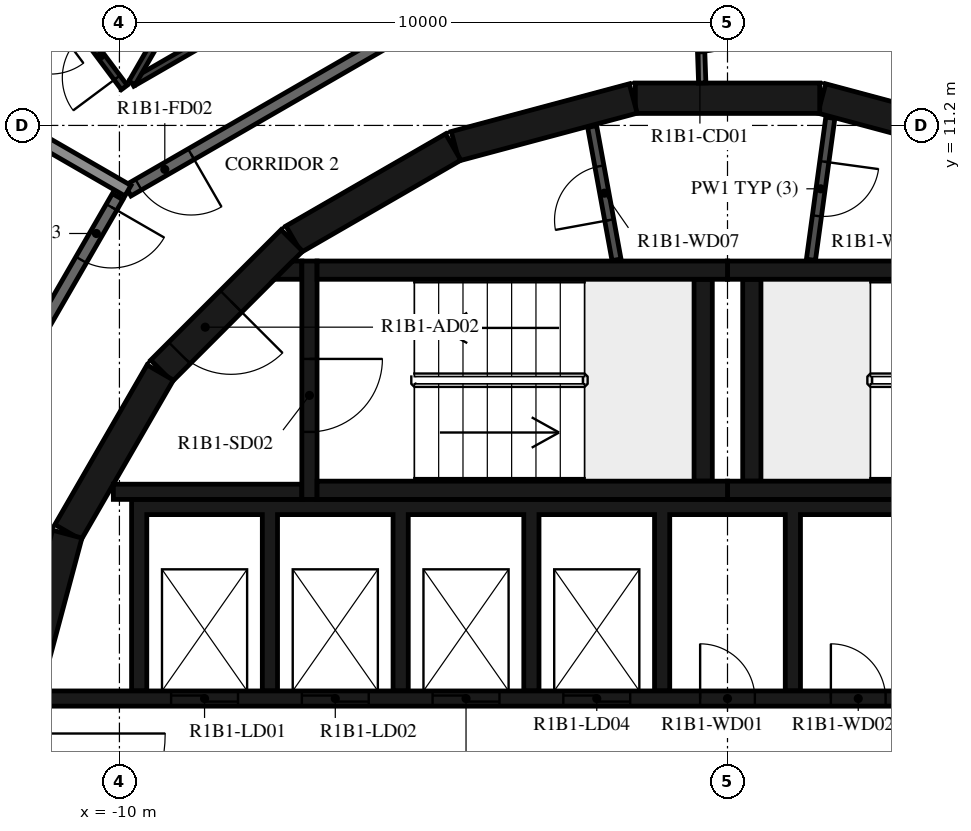
"""IFC4 building model, lengths in metres.
Left out: names, types, materials, properties, quantities, classifications, styles, units other than length and angle.
Written with IfcOpenShell. Run it as: python <this file> out.ifc"""

import sys

from ifc_helpers import new_model, si_unit, direction, frame, frame_2d, origin, place, context, subcontext, project, spatial, polyline, rectangle, outline, extrude, element, fill, save


model = new_model("IFC4")
c1 = context("Model", 3, precision=1e-05, world=origin(), true_north=direction((0.0, 1.0)))
c2 = subcontext(c1, "Body", "Model", "MODEL_VIEW")
j1 = project(units=[si_unit("LENGTHUNIT", "METRE"), si_unit("PLANEANGLEUNIT", "RADIAN")], contexts=[c1])
p1 = place(None, origin())
s1 = spatial("IfcSite", under=j1, at=p1, CompositionType="ELEMENT")
p2 = place(p1, origin())
s2 = spatial("IfcBuilding", under=s1, at=p2, CompositionType="ELEMENT")
p3 = place(p2, frame((0.0, 0.0, 48.9)))
s3 = spatial("IfcBuildingStorey", under=s2, at=p3, CompositionType="ELEMENT", Elevation=48.9)
for number, where, z_axis, x_axis in (
    (1, (4.479, 10.858, 0.0), (0.0, 0.0, 1.0), (-0.966, 0.259, 0.0)),
    (2, (1.516, 11.647, 0.0), (0.0, 0.0, 1.0), (-1.0, 0.0, 0.0)),
    (3, (-1.55, 11.643, 0.0), (0.0, 0.0, 1.0), (-0.966, -0.259, 0.0)),
    (4, (-4.51, 10.845, 0.0), (0.0, 0.0, 1.0), (-0.866, -0.5, 0.0)),
):
    element("IfcWall", number, at=place(p3, frame(where, z_axis=z_axis, x_axis=x_axis)), inside=s3, PredefinedType="SHEAR", context=c2, shape_type="SweptSolid", body=[
        extrude(rectangle(XDim=3.033, YDim=0.5, at=frame_2d((1.516, 0.0))), origin(), (0.0, 0.0, 1.0), 3.12),
    ])
p4 = place(p3, frame((-7.164, 9.308, 0.0), z_axis=(0.0, 0.0, 1.0), x_axis=(-0.707106781187, -0.707106781187, 0.0)))
e5 = element("IfcWall", 5, at=p4, inside=s3, PredefinedType="SHEAR", context=c2, shape_type="SweptSolid", body=[
    extrude(rectangle(XDim=3.032, YDim=0.5, at=frame_2d((1.516, 0.0))), origin(), (0.0, 0.0, 1.0), 3.12),
])
p5 = place(p4, frame((1.416, 0.0, 0.0)))
e6 = element("IfcOpeningElement", 6, at=p5, cuts=e5, PredefinedType="OPENING", context=c2, shape_type="SweptSolid", body=[
    extrude(rectangle(XDim=1.2, YDim=2.1, at=frame_2d((0.6, 1.05))), frame((0.0, 0.26, 0.0), z_axis=(0.0, -1.0, 0.0), x_axis=(1.0, 0.0, 0.0)), (0.0, 0.0, 1.0), 0.52),
])
for number, where, z_axis, x_axis in (
    (7, (-9.329, 7.137, 0.0), (0.0, 0.0, 1.0), (-0.5, -0.866, 0.0)),
    (8, (-10.858, 4.479, 0.0), (0.0, 0.0, 1.0), (-0.259, -0.966, 0.0)),
):
    element("IfcWall", number, at=place(p3, frame(where, z_axis=z_axis, x_axis=x_axis)), inside=s3, PredefinedType="SHEAR", context=c2, shape_type="SweptSolid", body=[
        extrude(rectangle(XDim=3.033, YDim=0.5, at=frame_2d((1.516, 0.0))), origin(), (0.0, 0.0, 1.0), 3.12),
    ])
for number, where, z_axis, x_axis in (
    (9, (0.0, 5.2, 0.0), (0.0, 0.0, 1.0), (1.0, 0.0, 0.0)),
    (10, (0.0, 8.82, 0.0), (0.0, 0.0, 1.0), (1.0, 0.0, 0.0)),
):
    element("IfcWall", number, at=place(p3, frame(where, z_axis=z_axis, x_axis=x_axis)), inside=s3, PredefinedType="SHEAR", context=c2, shape_type="SweptSolid", body=[
        extrude(rectangle(XDim=6.75, YDim=0.3, at=frame_2d((3.375, 0.0))), origin(), (0.0, 0.0, 1.0), 3.12),
    ])
p6 = place(p3, frame((0.4, 5.35, 0.0), z_axis=(0.0, 0.0, 1.0), x_axis=(0.0, 1.0, 0.0)))
e11 = element("IfcWall", 11, at=p6, inside=s3, PredefinedType="SHEAR", context=c2, shape_type="SweptSolid", body=[
    extrude(rectangle(XDim=3.32, YDim=0.3, at=frame_2d((1.66, 0.0))), origin(), (0.0, 0.0, 1.0), 3.12),
])
for number, where, z_axis, x_axis in (
    (12, (-6.75, 5.2, 0.0), (0.0, 0.0, 1.0), (1.0, 0.0, 0.0)),
    (13, (-6.75, 8.82, 0.0), (0.0, 0.0, 1.0), (1.0, 0.0, 0.0)),
):
    element("IfcWall", number, at=place(p3, frame(where, z_axis=z_axis, x_axis=x_axis)), inside=s3, PredefinedType="SHEAR", context=c2, shape_type="SweptSolid", body=[
        extrude(rectangle(XDim=6.75, YDim=0.3, at=frame_2d((3.375, 0.0))), origin(), (0.0, 0.0, 1.0), 3.12),
    ])
p7 = place(p3, frame((-0.4, 5.35, 0.0), z_axis=(0.0, 0.0, 1.0), x_axis=(0.0, 1.0, 0.0)))
e14 = element("IfcWall", 14, at=p7, inside=s3, PredefinedType="SHEAR", context=c2, shape_type="SweptSolid", body=[
    extrude(rectangle(XDim=3.32, YDim=0.3, at=frame_2d((1.66, 0.0))), origin(), (0.0, 0.0, 1.0), 3.12),
])
p8 = place(p3, frame((-6.875, 8.97, 0.0), z_axis=(0.0, 0.0, 1.0), x_axis=(0.0, -1.0, 0.0)))
e15 = element("IfcWall", 15, at=p8, inside=s3, PredefinedType="SHEAR", context=c2, shape_type="SweptSolid", body=[
    extrude(rectangle(XDim=3.92, YDim=0.25, at=frame_2d((1.96, 0.0))), origin(), (0.0, 0.0, 1.0), 3.12),
])
p9 = place(p8, frame((1.61, 0.0, 0.0)))
e16 = element("IfcOpeningElement", 16, at=p9, cuts=e15, PredefinedType="OPENING", context=c2, shape_type="SweptSolid", body=[
    extrude(rectangle(XDim=1.2, YDim=2.1, at=frame_2d((0.6, 1.05))), frame((0.0, 0.135, 0.0), z_axis=(0.0, -1.0, 0.0), x_axis=(1.0, 0.0, 0.0)), (0.0, 0.0, 1.0), 0.27),
])
p10 = place(p3, frame((-7.0, 5.175, 0.0), z_axis=(0.0, 0.0, 1.0), x_axis=(-1.0, 0.0, 0.0)))
e17 = element("IfcWall", 17, at=p10, inside=s3, PredefinedType="SHEAR", context=c2, shape_type="SweptSolid", body=[
    extrude(rectangle(XDim=3.1, YDim=0.25, at=frame_2d((1.55, 0.0))), origin(), (0.0, 0.0, 1.0), 3.12),
])
p11 = place(p3, origin())
e18 = element("IfcWall", 18, at=p11, inside=s3, PredefinedType="SHEAR", context=c2, shape_type="SweptSolid", body=[
    extrude(outline(polyline([(-7.148, 8.97), (-7.0, 8.97), (-7.0, 8.67), (-7.448, 8.67), (-7.148, 8.97)])), origin(), (0.0, 0.0, 1.0), 3.12),
])
p12 = place(p3, origin())
e19 = element("IfcWall", 19, at=p12, inside=s3, PredefinedType="SHEAR", context=c2, shape_type="SweptSolid", body=[
    extrude(outline(polyline([(-9.55, 4.8), (-7.65, 4.8), (-7.65, 1.9), (-7.4, 1.9), (-7.4, 4.8), (-5.5, 4.8), (-5.5, 1.9), (-5.25, 1.9), (-5.25, 4.8), (-3.35, 4.8), (-3.35, 1.9), (-3.1, 1.9), (-3.1, 4.8), (-1.2, 4.8), (-1.2, 1.9), (-0.95, 1.9), (-0.95, 4.8), (0.95, 4.8), (0.95, 1.9), (1.2, 1.9), (1.2, 4.8), (3.1, 4.8), (3.1, 1.9), (3.35, 1.9), (3.35, 4.8), (5.25, 4.8), (5.25, 1.9), (5.5, 1.9), (5.5, 4.8), (7.4, 4.8), (7.4, 1.9), (7.65, 1.9), (7.65, 4.8), (9.55, 4.8), (9.55, 1.9), (9.8, 1.9), (9.8, 4.8), (9.8, 5.05), (-9.8, 5.05), (-9.8, 4.8), (-9.8, 1.9), (-9.55, 1.9), (-9.55, 4.8)])), origin(), (0.0, 0.0, 1.0), 3.12),
])
p13 = place(p3, frame((-11.28, 1.775, 0.0), z_axis=(0.0, 0.0, 1.0), x_axis=(1.0, 0.0, 0.0)))
e20 = element("IfcWall", 20, at=p13, inside=s3, PredefinedType="SHEAR", context=c2, shape_type="SweptSolid", body=[
    extrude(rectangle(XDim=14.38, YDim=0.25, at=frame_2d((7.19, 0.0))), origin(), (0.0, 0.0, 1.0), 3.12),
])
p14 = place(p13, frame((2.13, 0.0, 0.0)))
e21 = element("IfcOpeningElement", 21, at=p14, cuts=e20, PredefinedType="OPENING", context=c2, shape_type="SweptSolid", body=[
    extrude(rectangle(XDim=1.1, YDim=2.1, at=frame_2d((0.55, 1.05))), frame((0.0, 0.135, 0.0), z_axis=(0.0, -1.0, 0.0), x_axis=(1.0, 0.0, 0.0)), (0.0, 0.0, 1.0), 0.27),
])
p15 = place(p13, frame((4.28, 0.0, 0.0)))
e22 = element("IfcOpeningElement", 22, at=p15, cuts=e20, PredefinedType="OPENING", context=c2, shape_type="SweptSolid", body=[
    extrude(rectangle(XDim=1.1, YDim=2.1, at=frame_2d((0.55, 1.05))), frame((0.0, 0.135, 0.0), z_axis=(0.0, -1.0, 0.0), x_axis=(1.0, 0.0, 0.0)), (0.0, 0.0, 1.0), 0.27),
])
p16 = place(p13, frame((6.43, 0.0, 0.0)))
e23 = element("IfcOpeningElement", 23, at=p16, cuts=e20, PredefinedType="OPENING", context=c2, shape_type="SweptSolid", body=[
    extrude(rectangle(XDim=1.1, YDim=2.1, at=frame_2d((0.55, 1.05))), frame((0.0, 0.135, 0.0), z_axis=(0.0, -1.0, 0.0), x_axis=(1.0, 0.0, 0.0)), (0.0, 0.0, 1.0), 0.27),
])
p17 = place(p13, frame((8.58, 0.0, 0.0)))
e24 = element("IfcOpeningElement", 24, at=p17, cuts=e20, PredefinedType="OPENING", context=c2, shape_type="SweptSolid", body=[
    extrude(rectangle(XDim=1.1, YDim=2.1, at=frame_2d((0.55, 1.05))), frame((0.0, 0.135, 0.0), z_axis=(0.0, -1.0, 0.0), x_axis=(1.0, 0.0, 0.0)), (0.0, 0.0, 1.0), 0.27),
])
p18 = place(p13, frame((10.83, 0.0, 0.0)))
e25 = element("IfcOpeningElement", 25, at=p18, cuts=e20, PredefinedType="OPENING", context=c2, shape_type="SweptSolid", body=[
    extrude(rectangle(XDim=0.9, YDim=2.1, at=frame_2d((0.45, 1.05))), frame((0.0, 0.135, 0.0), z_axis=(0.0, -1.0, 0.0), x_axis=(1.0, 0.0, 0.0)), (0.0, 0.0, 1.0), 0.27),
])
p19 = place(p13, frame((12.98, 0.0, 0.0)))
e26 = element("IfcOpeningElement", 26, at=p19, cuts=e20, PredefinedType="OPENING", context=c2, shape_type="SweptSolid", body=[
    extrude(rectangle(XDim=0.9, YDim=2.1, at=frame_2d((0.45, 1.05))), frame((0.0, 0.135, 0.0), z_axis=(0.0, -1.0, 0.0), x_axis=(1.0, 0.0, 0.0)), (0.0, 0.0, 1.0), 0.27),
])
p20 = place(p3, frame((1.691, 11.326, 0.0), z_axis=(0.0, 0.0, 1.0), x_axis=(-0.135344253201, -0.990798633994, 0.0)))
e27 = element("IfcWall", 27, at=p20, inside=s3, PredefinedType="PARTITIONING", context=c2, shape_type="SweptSolid", body=[
    extrude(rectangle(XDim=2.358, YDim=0.15, at=frame_2d((1.179, 0.0))), origin(), (0.0, 0.0, 1.0), 3.12),
])
p21 = place(p20, frame((0.729, 0.0, 0.0)))
e28 = element("IfcOpeningElement", 28, at=p21, cuts=e27, PredefinedType="OPENING", context=c2, shape_type="SweptSolid", body=[
    extrude(rectangle(XDim=0.9, YDim=2.1, at=frame_2d((0.45, 1.05))), frame((0.0, 0.085, 0.0), z_axis=(0.0, -1.0, 0.0), x_axis=(1.0, 0.0, 0.0)), (0.0, 0.0, 1.0), 0.17),
])
p22 = place(p3, frame((-1.825, 8.99, 0.0), z_axis=(0.0, 0.0, 1.0), x_axis=(-0.179955206115, 0.983674805915, 0.0)))
e29 = element("IfcWall", 29, at=p22, inside=s3, PredefinedType="PARTITIONING", context=c2, shape_type="SweptSolid", body=[
    extrude(rectangle(XDim=2.229, YDim=0.15, at=frame_2d((1.115, 0.0))), origin(), (0.0, 0.0, 1.0), 3.12),
])
p23 = place(p22, frame((0.665, 0.0, 0.0)))
e30 = element("IfcOpeningElement", 30, at=p23, cuts=e29, PredefinedType="OPENING", context=c2, shape_type="SweptSolid", body=[
    extrude(rectangle(XDim=0.9, YDim=2.1, at=frame_2d((0.45, 1.05))), frame((0.0, 0.085, 0.0), z_axis=(0.0, -1.0, 0.0), x_axis=(1.0, 0.0, 0.0)), (0.0, 0.0, 1.0), 0.17),
])
p24 = place(p3, frame((-0.479, 13.7, 0.0), z_axis=(0.0, 0.0, 1.0), x_axis=(0.034919103017, -0.999390142159, 0.0)))
e31 = element("IfcWall", 31, at=p24, inside=s3, PredefinedType="PARTITIONING", context=c2, shape_type="SweptSolid", body=[
    extrude(rectangle(XDim=1.804, YDim=0.12, at=frame_2d((0.902, 0.0))), origin(), (0.0, 0.0, 1.0), 3.12),
])
p25 = place(p24, frame((0.11, 0.0, 0.0)))
e32 = element("IfcOpeningElement", 32, at=p25, cuts=e31, PredefinedType="OPENING", context=c2, shape_type="SweptSolid", body=[
    extrude(rectangle(XDim=1.2, YDim=2.1, at=frame_2d((0.6, 1.05))), frame((0.0, 0.07, 0.0), z_axis=(0.0, -1.0, 0.0), x_axis=(1.0, 0.0, 0.0)), (0.0, 0.0, 1.0), 0.14),
])
p26 = place(p3, frame((-3.671, 13.7, 0.0), z_axis=(0.0, 0.0, 1.0), x_axis=(-0.866031419417, -0.499989580474, 0.0)))
e33 = element("IfcWall", 33, at=p26, inside=s3, PredefinedType="STANDARD", context=c2, shape_type="SweptSolid", body=[
    extrude(rectangle(XDim=7.147, YDim=0.2, at=frame_2d((3.573, 0.0))), origin(), (0.0, 0.0, 1.0), 3.12),
])
p27 = place(p26, frame((5.947, 0.0, 0.0)))
e34 = element("IfcOpeningElement", 34, at=p27, cuts=e33, PredefinedType="OPENING", context=c2, shape_type="SweptSolid", body=[
    extrude(rectangle(XDim=1.0, YDim=2.1, at=frame_2d((0.5, 1.05))), frame((0.0, 0.11, 0.0), z_axis=(0.0, -1.0, 0.0), x_axis=(1.0, 0.0, 0.0)), (0.0, 0.0, 1.0), 0.22),
])
p28 = place(p3, frame((-10.029, 10.029, 0.0), z_axis=(0.0, 0.0, 1.0), x_axis=(-0.500001669485, -0.866024439905, 0.0)))
e35 = element("IfcWall", 35, at=p28, inside=s3, PredefinedType="STANDARD", context=c2, shape_type="SweptSolid", body=[
    extrude(rectangle(XDim=7.342, YDim=0.2, at=frame_2d((3.671, 0.0))), origin(), (0.0, 0.0, 1.0), 3.12),
])
p29 = place(p28, frame((0.2, 0.0, 0.0)))
e36 = element("IfcOpeningElement", 36, at=p29, cuts=e35, PredefinedType="OPENING", context=c2, shape_type="SweptSolid", body=[
    extrude(rectangle(XDim=1.0, YDim=2.1, at=frame_2d((0.5, 1.05))), frame((0.0, 0.11, 0.0), z_axis=(0.0, -1.0, 0.0), x_axis=(1.0, 0.0, 0.0)), (0.0, 0.0, 1.0), 0.22),
])
p30 = place(p3, frame((-15.08, 13.14, 0.0), z_axis=(0.0, 0.0, 1.0), x_axis=(0.86603112331, -0.49999009336, 0.0)))
e37 = element("IfcWall", 37, at=p30, inside=s3, PredefinedType="STANDARD", context=c2, shape_type="SweptSolid", body=[
    extrude(rectangle(XDim=6.027, YDim=0.2, at=frame_2d((3.014, 0.0))), origin(), (0.0, 0.0, 1.0), 2.73),
])
p31 = place(p3, frame((-9.92, 11.824, 0.0), z_axis=(0.0, 0.0, 1.0), x_axis=(-0.597853402964, 0.801605456921, 0.0)))
e38 = element("IfcWall", 38, at=p31, inside=s3, PredefinedType="PARTITIONING", context=c2, shape_type="SweptSolid", body=[
    extrude(rectangle(XDim=1.621, YDim=0.12, at=frame_2d((0.811, 0.0))), origin(), (0.0, 0.0, 1.0), 3.12),
])
p32 = place(p31, frame((0.2, 0.0, 0.0)))
e39 = element("IfcOpeningElement", 39, at=p32, cuts=e38, PredefinedType="OPENING", context=c2, shape_type="SweptSolid", body=[
    extrude(rectangle(XDim=0.9, YDim=2.1, at=frame_2d((0.45, 1.05))), frame((0.0, 0.07, 0.0), z_axis=(0.0, -1.0, 0.0), x_axis=(1.0, 0.0, 0.0)), (0.0, 0.0, 1.0), 0.14),
])
p33 = place(p3, frame((-4.088, 15.191, 0.0), z_axis=(0.0, 0.0, 1.0), x_axis=(-0.866024500911, -0.50000156382, 0.0)))
e40 = element("IfcWall", 40, at=p33, inside=s3, PredefinedType="PARTITIONING", context=c2, shape_type="SweptSolid", body=[
    extrude(rectangle(XDim=6.587, YDim=0.12, at=frame_2d((3.294, 0.0))), origin(), (0.0, 0.0, 1.0), 3.12),
])
p34 = place(p33, frame((0.4, 0.0, 0.0)))
e41 = element("IfcOpeningElement", 41, at=p34, cuts=e40, PredefinedType="OPENING", context=c2, shape_type="SweptSolid", body=[
    extrude(rectangle(XDim=0.8, YDim=2.1, at=frame_2d((0.4, 1.05))), frame((0.0, 0.07, 0.0), z_axis=(0.0, -1.0, 0.0), x_axis=(1.0, 0.0, 0.0)), (0.0, 0.0, 1.0), 0.14),
])
p35 = place(p3, frame((-10.889, 13.124, 0.0), z_axis=(0.0, 0.0, 1.0), x_axis=(-0.801616976804, -0.597837956724, 0.0)))
e42 = element("IfcWall", 42, at=p35, inside=s3, PredefinedType="PARTITIONING", context=c2, shape_type="SweptSolid", body=[
    extrude(rectangle(XDim=1.7, YDim=0.12, at=frame_2d((0.85, 0.0))), origin(), (0.0, 0.0, 1.0), 3.12),
])
p36 = place(p35, frame((0.3, 0.0, 0.0)))
e43 = element("IfcOpeningElement", 43, at=p36, cuts=e42, PredefinedType="OPENING", context=c2, shape_type="SweptSolid", body=[
    extrude(rectangle(XDim=0.9, YDim=2.1, at=frame_2d((0.45, 1.05))), frame((0.0, 0.07, 0.0), z_axis=(0.0, -1.0, 0.0), x_axis=(1.0, 0.0, 0.0)), (0.0, 0.0, 1.0), 0.14),
])
p37 = place(p3, frame((-9.793, 11.897, 0.0), z_axis=(0.0, 0.0, 1.0), x_axis=(0.499981117606, 0.866036305265, 0.0)))
e44 = element("IfcWall", 44, at=p37, inside=s3, PredefinedType="PARTITIONING", context=c2, shape_type="SweptSolid", body=[
    extrude(rectangle(XDim=14.434, YDim=0.12, at=frame_2d((7.217, 0.0))), origin(), (0.0, 0.0, 1.0), 3.12),
])
p38 = place(p37, frame((11.97, 0.0, 0.0)))
e45 = element("IfcOpeningElement", 45, at=p38, cuts=e44, PredefinedType="OPENING", context=c2, shape_type="SweptSolid", body=[
    extrude(rectangle(XDim=0.9, YDim=2.1, at=frame_2d((0.45, 1.05))), frame((0.0, 0.07, 0.0), z_axis=(0.0, -1.0, 0.0), x_axis=(1.0, 0.0, 0.0)), (0.0, 0.0, 1.0), 0.14),
])
p39 = place(p9, origin())
e46 = element("IfcDoor", 46, at=p39, inside=s3, OperationType="SINGLE_SWING_LEFT", PredefinedType="DOOR", context=c2, shape_type="SweptSolid", body=[
    extrude(rectangle(XDim=1.2, YDim=2.1, at=frame_2d((0.6, 1.05))), frame((0.0, 0.025, 0.0), z_axis=(0.0, -1.0, 0.0), x_axis=(1.0, 0.0, 0.0)), (0.0, 0.0, 1.0), 0.05),
])
fill(e16, e46)
p40 = place(p5, origin())
e47 = element("IfcDoor", 47, at=p40, inside=s3, OperationType="SINGLE_SWING_RIGHT", PredefinedType="DOOR", context=c2, shape_type="SweptSolid", body=[
    extrude(rectangle(XDim=1.2, YDim=2.1, at=frame_2d((0.6, 1.05))), frame((0.0, 0.025, 0.0), z_axis=(0.0, -1.0, 0.0), x_axis=(1.0, 0.0, 0.0)), (0.0, 0.0, 1.0), 0.05),
])
fill(e6, e47)
p41 = place(p14, origin())
e48 = element("IfcDoor", 48, at=p41, inside=s3, OperationType="DOUBLE_DOOR_SLIDING", PredefinedType="DOOR", context=c2, shape_type="SweptSolid", body=[
    extrude(rectangle(XDim=1.1, YDim=2.1, at=frame_2d((0.55, 1.05))), frame((0.0, 0.025, 0.0), z_axis=(0.0, -1.0, 0.0), x_axis=(1.0, 0.0, 0.0)), (0.0, 0.0, 1.0), 0.05),
])
fill(e21, e48)
p42 = place(p15, origin())
e49 = element("IfcDoor", 49, at=p42, inside=s3, OperationType="DOUBLE_DOOR_SLIDING", PredefinedType="DOOR", context=c2, shape_type="SweptSolid", body=[
    extrude(rectangle(XDim=1.1, YDim=2.1, at=frame_2d((0.55, 1.05))), frame((0.0, 0.025, 0.0), z_axis=(0.0, -1.0, 0.0), x_axis=(1.0, 0.0, 0.0)), (0.0, 0.0, 1.0), 0.05),
])
fill(e22, e49)
p43 = place(p16, origin())
e50 = element("IfcDoor", 50, at=p43, inside=s3, OperationType="DOUBLE_DOOR_SLIDING", PredefinedType="DOOR", context=c2, shape_type="SweptSolid", body=[
    extrude(rectangle(XDim=1.1, YDim=2.1, at=frame_2d((0.55, 1.05))), frame((0.0, 0.025, 0.0), z_axis=(0.0, -1.0, 0.0), x_axis=(1.0, 0.0, 0.0)), (0.0, 0.0, 1.0), 0.05),
])
fill(e23, e50)
p44 = place(p17, origin())
e51 = element("IfcDoor", 51, at=p44, inside=s3, OperationType="DOUBLE_DOOR_SLIDING", PredefinedType="DOOR", context=c2, shape_type="SweptSolid", body=[
    extrude(rectangle(XDim=1.1, YDim=2.1, at=frame_2d((0.55, 1.05))), frame((0.0, 0.025, 0.0), z_axis=(0.0, -1.0, 0.0), x_axis=(1.0, 0.0, 0.0)), (0.0, 0.0, 1.0), 0.05),
])
fill(e24, e51)
p45 = place(p18, origin())
e52 = element("IfcDoor", 52, at=p45, inside=s3, OperationType="SINGLE_SWING_RIGHT", PredefinedType="DOOR", context=c2, shape_type="SweptSolid", body=[
    extrude(rectangle(XDim=0.9, YDim=2.1, at=frame_2d((0.45, 1.05))), frame((0.0, 0.025, 0.0), z_axis=(0.0, -1.0, 0.0), x_axis=(1.0, 0.0, 0.0)), (0.0, 0.0, 1.0), 0.05),
])
fill(e25, e52)
p46 = place(p19, origin())
e53 = element("IfcDoor", 53, at=p46, inside=s3, OperationType="SINGLE_SWING_LEFT", PredefinedType="DOOR", context=c2, shape_type="SweptSolid", body=[
    extrude(rectangle(XDim=0.9, YDim=2.1, at=frame_2d((0.45, 1.05))), frame((0.0, 0.025, 0.0), z_axis=(0.0, -1.0, 0.0), x_axis=(1.0, 0.0, 0.0)), (0.0, 0.0, 1.0), 0.05),
])
fill(e26, e53)
p47 = place(p21, origin())
e54 = element("IfcDoor", 54, at=p47, inside=s3, OperationType="SINGLE_SWING_LEFT", PredefinedType="DOOR", context=c2, shape_type="SweptSolid", body=[
    extrude(rectangle(XDim=0.9, YDim=2.1, at=frame_2d((0.45, 1.05))), frame((0.0, 0.025, 0.0), z_axis=(0.0, -1.0, 0.0), x_axis=(1.0, 0.0, 0.0)), (0.0, 0.0, 1.0), 0.05),
])
fill(e28, e54)
p48 = place(p23, origin())
e55 = element("IfcDoor", 55, at=p48, inside=s3, OperationType="SINGLE_SWING_RIGHT", PredefinedType="DOOR", context=c2, shape_type="SweptSolid", body=[
    extrude(rectangle(XDim=0.9, YDim=2.1, at=frame_2d((0.45, 1.05))), frame((0.0, 0.025, 0.0), z_axis=(0.0, -1.0, 0.0), x_axis=(1.0, 0.0, 0.0)), (0.0, 0.0, 1.0), 0.05),
])
fill(e30, e55)
p49 = place(p27, origin())
e56 = element("IfcDoor", 56, at=p49, inside=s3, OperationType="SINGLE_SWING_LEFT", PredefinedType="DOOR", context=c2, shape_type="SweptSolid", body=[
    extrude(rectangle(XDim=1.0, YDim=2.1, at=frame_2d((0.5, 1.05))), frame((0.0, 0.025, 0.0), z_axis=(0.0, -1.0, 0.0), x_axis=(1.0, 0.0, 0.0)), (0.0, 0.0, 1.0), 0.05),
])
fill(e34, e56)
p50 = place(p32, origin())
e57 = element("IfcDoor", 57, at=p50, inside=s3, OperationType="SINGLE_SWING_RIGHT", PredefinedType="DOOR", context=c2, shape_type="SweptSolid", body=[
    extrude(rectangle(XDim=0.9, YDim=2.1, at=frame_2d((0.45, 1.05))), frame((0.0, 0.025, 0.0), z_axis=(0.0, -1.0, 0.0), x_axis=(1.0, 0.0, 0.0)), (0.0, 0.0, 1.0), 0.05),
])
fill(e39, e57)
p51 = place(p29, origin())
e58 = element("IfcDoor", 58, at=p51, inside=s3, OperationType="SINGLE_SWING_LEFT", PredefinedType="DOOR", context=c2, shape_type="SweptSolid", body=[
    extrude(rectangle(XDim=1.0, YDim=2.1, at=frame_2d((0.5, 1.05))), frame((0.0, 0.025, 0.0), z_axis=(0.0, -1.0, 0.0), x_axis=(1.0, 0.0, 0.0)), (0.0, 0.0, 1.0), 0.05),
])
fill(e36, e58)
p52 = place(p25, origin())
e59 = element("IfcDoor", 59, at=p52, inside=s3, OperationType="DOUBLE_DOOR_SINGLE_SWING", PredefinedType="DOOR", context=c2, shape_type="SweptSolid", body=[
    extrude(rectangle(XDim=1.2, YDim=2.1, at=frame_2d((0.6, 1.05))), frame((0.0, 0.025, 0.0), z_axis=(0.0, -1.0, 0.0), x_axis=(1.0, 0.0, 0.0)), (0.0, 0.0, 1.0), 0.05),
])
fill(e32, e59)
save(model, sys.argv[1])
